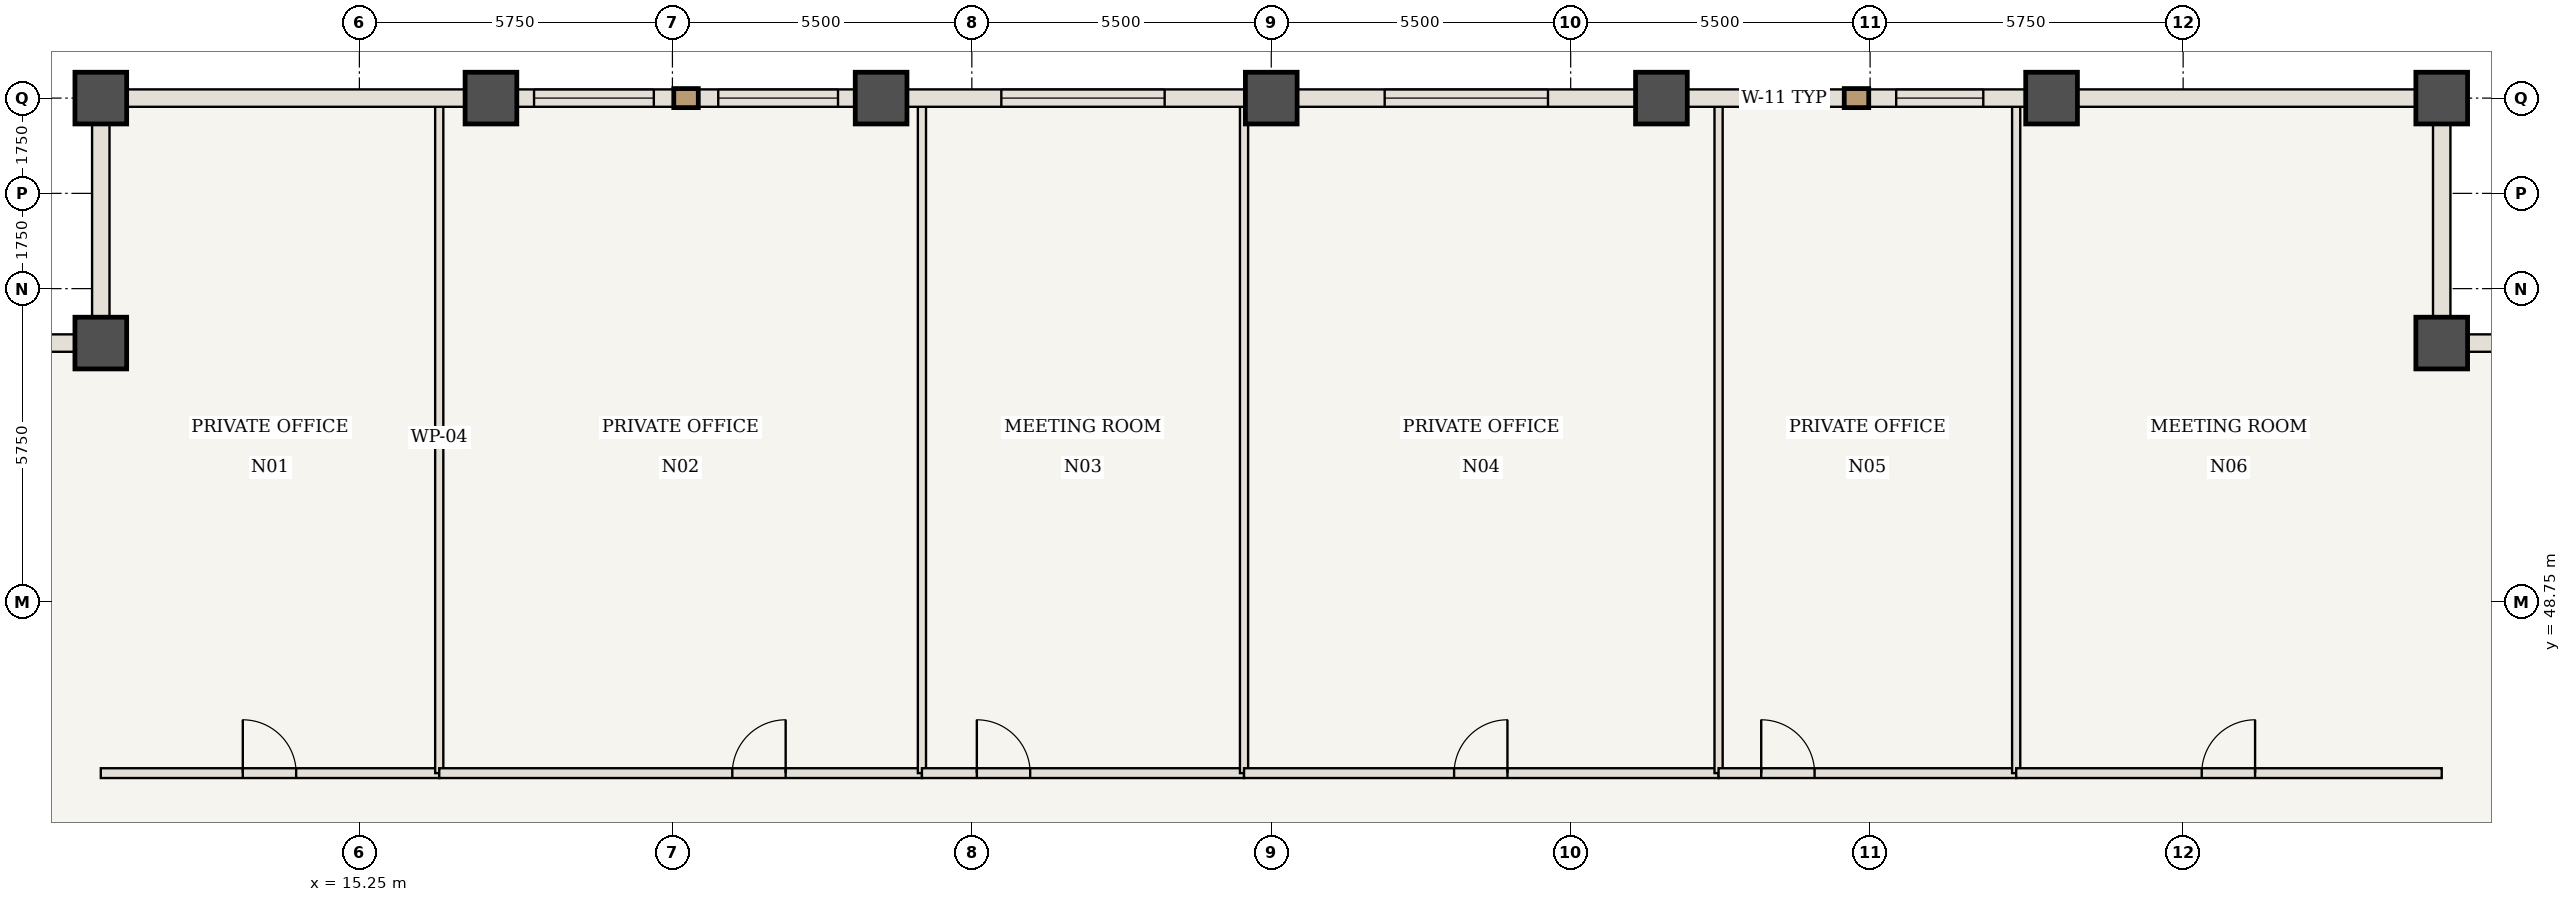
"""IFC4 building model, lengths in metres.
Left out: names, types, materials, properties, quantities, classifications, styles, units other than length and angle.
Written with IfcOpenShell. Run it as: python <this file> out.ifc"""

import sys

from ifc_helpers import new_model, si_unit, direction, frame, frame_2d, origin, origin_2d, place, context, subcontext, project, spatial, rectangle, extrude, element, fill, save


model = new_model("IFC4")
c1 = context("Model", 3, precision=1e-05, world=origin(), true_north=direction((0.0, 1.0)))
c2 = subcontext(c1, "Body", "Model", "MODEL_VIEW")
j1 = project(units=[si_unit("LENGTHUNIT", "METRE"), si_unit("PLANEANGLEUNIT", "RADIAN")], contexts=[c1])
p1 = place(None, origin())
s1 = spatial("IfcSite", under=j1, at=p1, CompositionType="ELEMENT")
p2 = place(p1, origin())
s2 = spatial("IfcBuilding", under=s1, at=p2, CompositionType="ELEMENT")
p3 = place(p2, frame((0.0, 0.0, 118.3)))
s3 = spatial("IfcBuildingStorey", under=s2, at=p3, CompositionType="ELEMENT", Elevation=118.3)
for number, where, z_axis, x_axis in (
    (1, (53.5, 53.5, 0.0), (0.0, 0.0, 1.0), (1.0, 0.0, 0.0)),
    (2, (53.5, 58.0, 0.0), (0.0, 0.0, 1.0), (1.0, 0.0, 0.0)),
    (3, (10.5, 58.0, 0.0), (0.0, 0.0, 1.0), (1.0, 0.0, 0.0)),
    (4, (10.5, 53.5, 0.0), (0.0, 0.0, 1.0), (1.0, 0.0, 0.0)),
    (5, (17.667, 58.0, 0.0), (0.0, 0.0, 1.0), (1.0, 0.0, 0.0)),
    (6, (24.833, 58.0, 0.0), (0.0, 0.0, 1.0), (1.0, 0.0, 0.0)),
    (7, (32.0, 58.0, 0.0), (0.0, 0.0, 1.0), (1.0, 0.0, 0.0)),
    (8, (39.167, 58.0, 0.0), (0.0, 0.0, 1.0), (1.0, 0.0, 0.0)),
    (9, (46.333, 58.0, 0.0), (0.0, 0.0, 1.0), (1.0, 0.0, 0.0)),
):
    element("IfcColumn", number, at=place(p3, frame(where, z_axis=z_axis, x_axis=x_axis)), inside=s3, PredefinedType="COLUMN", context=c2, shape_type="SweptSolid", body=[
        extrude(rectangle(XDim=0.95, YDim=0.95, at=origin_2d()), origin(), (0.0, 0.0, 1.0), 3.85),
    ])
p4 = place(p3, frame((10.5, 45.6, 0.0), z_axis=(0.0, 0.0, 1.0), x_axis=(1.0, 0.0, 0.0)))
e10 = element("IfcWall", 10, at=p4, inside=s3, PredefinedType="STANDARD", context=c2, shape_type="SweptSolid", body=[
    extrude(rectangle(XDim=6.217, YDim=0.18, at=frame_2d((3.108, 0.0))), origin(), (0.0, 0.0, 1.0), 3.685),
])
p5 = place(p4, frame((2.608, 0.0, 0.0)))
e11 = element("IfcOpeningElement", 11, at=p5, cuts=e10, PredefinedType="OPENING", context=c2, shape_type="SweptSolid", body=[
    extrude(rectangle(XDim=0.98, YDim=2.2, at=frame_2d((0.49, 1.1))), frame((0.0, 0.1, 0.0), z_axis=(0.0, -1.0, 0.0), x_axis=(1.0, 0.0, 0.0)), (0.0, 0.0, 1.0), 0.2),
])
p6 = place(p3, frame((16.717, 45.6, 0.0), z_axis=(0.0, 0.0, 1.0), x_axis=(0.0, 1.0, 0.0)))
e12 = element("IfcWall", 12, at=p6, inside=s3, PredefinedType="STANDARD", context=c2, shape_type="SweptSolid", body=[
    extrude(rectangle(XDim=12.34, YDim=0.15, at=frame_2d((6.17, 0.0))), origin(), (0.0, 0.0, 1.0), 3.685),
])
p7 = place(p3, frame((16.717, 45.6, 0.0), z_axis=(0.0, 0.0, 1.0), x_axis=(1.0, 0.0, 0.0)))
e13 = element("IfcWall", 13, at=p7, inside=s3, PredefinedType="STANDARD", context=c2, shape_type="SweptSolid", body=[
    extrude(rectangle(XDim=8.866, YDim=0.18, at=frame_2d((4.433, 0.0))), origin(), (0.0, 0.0, 1.0), 3.685),
])
p8 = place(p7, frame((5.383, 0.0, 0.0)))
e14 = element("IfcOpeningElement", 14, at=p8, cuts=e13, PredefinedType="OPENING", context=c2, shape_type="SweptSolid", body=[
    extrude(rectangle(XDim=0.98, YDim=2.2, at=frame_2d((0.49, 1.1))), frame((0.0, 0.1, 0.0), z_axis=(0.0, -1.0, 0.0), x_axis=(1.0, 0.0, 0.0)), (0.0, 0.0, 1.0), 0.2),
])
p9 = place(p3, frame((25.583, 45.6, 0.0), z_axis=(0.0, 0.0, 1.0), x_axis=(0.0, 1.0, 0.0)))
e15 = element("IfcWall", 15, at=p9, inside=s3, PredefinedType="STANDARD", context=c2, shape_type="SweptSolid", body=[
    extrude(rectangle(XDim=12.34, YDim=0.15, at=frame_2d((6.17, 0.0))), origin(), (0.0, 0.0, 1.0), 3.685),
])
p10 = place(p3, frame((25.583, 45.6, 0.0), z_axis=(0.0, 0.0, 1.0), x_axis=(1.0, 0.0, 0.0)))
e16 = element("IfcWall", 16, at=p10, inside=s3, PredefinedType="STANDARD", context=c2, shape_type="SweptSolid", body=[
    extrude(rectangle(XDim=5.917, YDim=0.18, at=frame_2d((2.958, 0.0))), origin(), (0.0, 0.0, 1.0), 3.685),
])
p11 = place(p10, frame((1.008, 0.0, 0.0)))
e17 = element("IfcOpeningElement", 17, at=p11, cuts=e16, PredefinedType="OPENING", context=c2, shape_type="SweptSolid", body=[
    extrude(rectangle(XDim=0.98, YDim=2.2, at=frame_2d((0.49, 1.1))), frame((0.0, 0.1, 0.0), z_axis=(0.0, -1.0, 0.0), x_axis=(1.0, 0.0, 0.0)), (0.0, 0.0, 1.0), 0.2),
])
p12 = place(p3, frame((31.5, 45.6, 0.0), z_axis=(0.0, 0.0, 1.0), x_axis=(0.0, 1.0, 0.0)))
e18 = element("IfcWall", 18, at=p12, inside=s3, PredefinedType="STANDARD", context=c2, shape_type="SweptSolid", body=[
    extrude(rectangle(XDim=12.34, YDim=0.15, at=frame_2d((6.17, 0.0))), origin(), (0.0, 0.0, 1.0), 3.685),
])
p13 = place(p3, frame((31.5, 45.6, 0.0), z_axis=(0.0, 0.0, 1.0), x_axis=(1.0, 0.0, 0.0)))
e19 = element("IfcWall", 19, at=p13, inside=s3, PredefinedType="STANDARD", context=c2, shape_type="SweptSolid", body=[
    extrude(rectangle(XDim=8.717, YDim=0.18, at=frame_2d((4.358, 0.0))), origin(), (0.0, 0.0, 1.0), 3.685),
])
p14 = place(p13, frame((3.858, 0.0, 0.0)))
e20 = element("IfcOpeningElement", 20, at=p14, cuts=e19, PredefinedType="OPENING", context=c2, shape_type="SweptSolid", body=[
    extrude(rectangle(XDim=0.98, YDim=2.2, at=frame_2d((0.49, 1.1))), frame((0.0, 0.1, 0.0), z_axis=(0.0, -1.0, 0.0), x_axis=(1.0, 0.0, 0.0)), (0.0, 0.0, 1.0), 0.2),
])
p15 = place(p3, frame((40.217, 45.6, 0.0), z_axis=(0.0, 0.0, 1.0), x_axis=(0.0, 1.0, 0.0)))
e21 = element("IfcWall", 21, at=p15, inside=s3, PredefinedType="STANDARD", context=c2, shape_type="SweptSolid", body=[
    extrude(rectangle(XDim=12.34, YDim=0.15, at=frame_2d((6.17, 0.0))), origin(), (0.0, 0.0, 1.0), 3.685),
])
p16 = place(p3, frame((40.217, 45.6, 0.0), z_axis=(0.0, 0.0, 1.0), x_axis=(1.0, 0.0, 0.0)))
e22 = element("IfcWall", 22, at=p16, inside=s3, PredefinedType="STANDARD", context=c2, shape_type="SweptSolid", body=[
    extrude(rectangle(XDim=5.467, YDim=0.18, at=frame_2d((2.733, 0.0))), origin(), (0.0, 0.0, 1.0), 3.685),
])
p17 = place(p16, frame((0.783, 0.0, 0.0)))
e23 = element("IfcOpeningElement", 23, at=p17, cuts=e22, PredefinedType="OPENING", context=c2, shape_type="SweptSolid", body=[
    extrude(rectangle(XDim=0.98, YDim=2.2, at=frame_2d((0.49, 1.1))), frame((0.0, 0.1, 0.0), z_axis=(0.0, -1.0, 0.0), x_axis=(1.0, 0.0, 0.0)), (0.0, 0.0, 1.0), 0.2),
])
p18 = place(p3, frame((45.683, 45.6, 0.0), z_axis=(0.0, 0.0, 1.0), x_axis=(0.0, 1.0, 0.0)))
e24 = element("IfcWall", 24, at=p18, inside=s3, PredefinedType="STANDARD", context=c2, shape_type="SweptSolid", body=[
    extrude(rectangle(XDim=12.34, YDim=0.15, at=frame_2d((6.17, 0.0))), origin(), (0.0, 0.0, 1.0), 3.685),
])
p19 = place(p3, frame((45.683, 45.6, 0.0), z_axis=(0.0, 0.0, 1.0), x_axis=(1.0, 0.0, 0.0)))
e25 = element("IfcWall", 25, at=p19, inside=s3, PredefinedType="STANDARD", context=c2, shape_type="SweptSolid", body=[
    extrude(rectangle(XDim=7.817, YDim=0.18, at=frame_2d((3.908, 0.0))), origin(), (0.0, 0.0, 1.0), 3.685),
])
p20 = place(p19, frame((3.408, 0.0, 0.0)))
e26 = element("IfcOpeningElement", 26, at=p20, cuts=e25, PredefinedType="OPENING", context=c2, shape_type="SweptSolid", body=[
    extrude(rectangle(XDim=0.98, YDim=2.2, at=frame_2d((0.49, 1.1))), frame((0.0, 0.1, 0.0), z_axis=(0.0, -1.0, 0.0), x_axis=(1.0, 0.0, 0.0)), (0.0, 0.0, 1.0), 0.2),
])
p21 = place(p3, frame((10.5, 58.0, 0.0), z_axis=(0.0, 0.0, 1.0), x_axis=(1.0, 0.0, 0.0)))
e27 = element("IfcWall", 27, at=p21, inside=s3, PredefinedType="USERDEFINED", context=c2, shape_type="SweptSolid", body=[
    extrude(rectangle(XDim=7.167, YDim=0.32, at=frame_2d((3.583, 0.0))), origin(), (0.0, 0.0, 1.0), 2.885),
])
p22 = place(p3, frame((17.667, 58.0, 0.0), z_axis=(0.0, 0.0, 1.0), x_axis=(1.0, 0.0, 0.0)))
e28 = element("IfcWall", 28, at=p22, inside=s3, PredefinedType="USERDEFINED", context=c2, shape_type="SweptSolid", body=[
    extrude(rectangle(XDim=7.167, YDim=0.32, at=frame_2d((3.583, 0.0))), origin(), (0.0, 0.0, 1.0), 2.885),
])
p23 = place(p22, frame((0.792, 0.0, 0.85)))
e29 = element("IfcOpeningElement", 29, at=p23, cuts=e28, PredefinedType="OPENING", context=c2, shape_type="SweptSolid", body=[
    extrude(rectangle(XDim=2.2, YDim=1.835, at=frame_2d((1.1, 0.917))), frame((0.0, 0.17, 0.0), z_axis=(0.0, -1.0, 0.0), x_axis=(1.0, 0.0, 0.0)), (0.0, 0.0, 1.0), 0.34),
])
p24 = place(p22, frame((4.175, 0.0, 0.85)))
e30 = element("IfcOpeningElement", 30, at=p24, cuts=e28, PredefinedType="OPENING", context=c2, shape_type="SweptSolid", body=[
    extrude(rectangle(XDim=2.2, YDim=1.835, at=frame_2d((1.1, 0.917))), frame((0.0, 0.17, 0.0), z_axis=(0.0, -1.0, 0.0), x_axis=(1.0, 0.0, 0.0)), (0.0, 0.0, 1.0), 0.34),
])
p25 = place(p3, frame((24.833, 58.0, 0.0), z_axis=(0.0, 0.0, 1.0), x_axis=(1.0, 0.0, 0.0)))
e31 = element("IfcWall", 31, at=p25, inside=s3, PredefinedType="USERDEFINED", context=c2, shape_type="SweptSolid", body=[
    extrude(rectangle(XDim=7.167, YDim=0.32, at=frame_2d((3.583, 0.0))), origin(), (0.0, 0.0, 1.0), 2.885),
])
p26 = place(p25, frame((2.208, 0.0, 0.85)))
e32 = element("IfcOpeningElement", 32, at=p26, cuts=e31, PredefinedType="OPENING", context=c2, shape_type="SweptSolid", body=[
    extrude(rectangle(XDim=3.0, YDim=1.835, at=frame_2d((1.5, 0.917))), frame((0.0, 0.17, 0.0), z_axis=(0.0, -1.0, 0.0), x_axis=(1.0, 0.0, 0.0)), (0.0, 0.0, 1.0), 0.34),
])
p27 = place(p3, frame((32.0, 58.0, 0.0), z_axis=(0.0, 0.0, 1.0), x_axis=(1.0, 0.0, 0.0)))
e33 = element("IfcWall", 33, at=p27, inside=s3, PredefinedType="USERDEFINED", context=c2, shape_type="SweptSolid", body=[
    extrude(rectangle(XDim=7.167, YDim=0.32, at=frame_2d((3.583, 0.0))), origin(), (0.0, 0.0, 1.0), 2.885),
])
p28 = place(p27, frame((2.083, 0.0, 0.85)))
e34 = element("IfcOpeningElement", 34, at=p28, cuts=e33, PredefinedType="OPENING", context=c2, shape_type="SweptSolid", body=[
    extrude(rectangle(XDim=3.0, YDim=1.835, at=frame_2d((1.5, 0.917))), frame((0.0, 0.17, 0.0), z_axis=(0.0, -1.0, 0.0), x_axis=(1.0, 0.0, 0.0)), (0.0, 0.0, 1.0), 0.34),
])
p29 = place(p3, frame((39.167, 58.0, 0.0), z_axis=(0.0, 0.0, 1.0), x_axis=(1.0, 0.0, 0.0)))
e35 = element("IfcWall", 35, at=p29, inside=s3, PredefinedType="USERDEFINED", context=c2, shape_type="SweptSolid", body=[
    extrude(rectangle(XDim=7.167, YDim=0.32, at=frame_2d((3.583, 0.0))), origin(), (0.0, 0.0, 1.0), 2.885),
])
p30 = place(p29, frame((1.454, 0.0, 0.85)))
e36 = element("IfcOpeningElement", 36, at=p30, cuts=e35, PredefinedType="OPENING", context=c2, shape_type="SweptSolid", body=[
    extrude(rectangle(XDim=1.6, YDim=1.835, at=frame_2d((0.8, 0.917))), frame((0.0, 0.17, 0.0), z_axis=(0.0, -1.0, 0.0), x_axis=(1.0, 0.0, 0.0)), (0.0, 0.0, 1.0), 0.34),
])
p31 = place(p29, frame((4.312, 0.0, 0.85)))
e37 = element("IfcOpeningElement", 37, at=p31, cuts=e35, PredefinedType="OPENING", context=c2, shape_type="SweptSolid", body=[
    extrude(rectangle(XDim=1.6, YDim=1.835, at=frame_2d((0.8, 0.917))), frame((0.0, 0.17, 0.0), z_axis=(0.0, -1.0, 0.0), x_axis=(1.0, 0.0, 0.0)), (0.0, 0.0, 1.0), 0.34),
])
p32 = place(p3, frame((46.333, 58.0, 0.0), z_axis=(0.0, 0.0, 1.0), x_axis=(1.0, 0.0, 0.0)))
e38 = element("IfcWall", 38, at=p32, inside=s3, PredefinedType="USERDEFINED", context=c2, shape_type="SweptSolid", body=[
    extrude(rectangle(XDim=7.167, YDim=0.32, at=frame_2d((3.583, 0.0))), origin(), (0.0, 0.0, 1.0), 2.885),
])
for number, where, z_axis, x_axis in (
    (39, (53.5, 53.5, 0.0), (0.0, 0.0, 1.0), (1.0, 0.0, 0.0)),
    (40, (53.5, 58.0, 0.0), (0.0, 0.0, 1.0), (0.0, -1.0, 0.0)),
    (41, (10.5, 53.5, 0.0), (0.0, 0.0, 1.0), (0.0, 1.0, 0.0)),
    (42, (6.0, 53.5, 0.0), (0.0, 0.0, 1.0), (1.0, 0.0, 0.0)),
):
    element("IfcWall", number, at=place(p3, frame(where, z_axis=z_axis, x_axis=x_axis)), inside=s3, PredefinedType="USERDEFINED", context=c2, shape_type="SweptSolid", body=[
        extrude(rectangle(XDim=4.5, YDim=0.32, at=frame_2d((2.25, 0.0))), origin(), (0.0, 0.0, 1.0), 2.885),
    ])
p33 = place(p5, origin())
e43 = element("IfcDoor", 43, at=p33, inside=s3, OperationType="SINGLE_SWING_LEFT", PredefinedType="DOOR", context=c2, shape_type="SweptSolid", body=[
    extrude(rectangle(XDim=0.98, YDim=2.2, at=frame_2d((0.49, 1.1))), frame((0.0, 0.025, 0.0), z_axis=(0.0, -1.0, 0.0), x_axis=(1.0, 0.0, 0.0)), (0.0, 0.0, 1.0), 0.05),
])
fill(e11, e43)
p34 = place(p8, origin())
e44 = element("IfcDoor", 44, at=p34, inside=s3, OperationType="SINGLE_SWING_RIGHT", PredefinedType="DOOR", context=c2, shape_type="SweptSolid", body=[
    extrude(rectangle(XDim=0.98, YDim=2.2, at=frame_2d((0.49, 1.1))), frame((0.0, 0.025, 0.0), z_axis=(0.0, -1.0, 0.0), x_axis=(1.0, 0.0, 0.0)), (0.0, 0.0, 1.0), 0.05),
])
fill(e14, e44)
p35 = place(p11, origin())
e45 = element("IfcDoor", 45, at=p35, inside=s3, OperationType="SINGLE_SWING_LEFT", PredefinedType="DOOR", context=c2, shape_type="SweptSolid", body=[
    extrude(rectangle(XDim=0.98, YDim=2.2, at=frame_2d((0.49, 1.1))), frame((0.0, 0.025, 0.0), z_axis=(0.0, -1.0, 0.0), x_axis=(1.0, 0.0, 0.0)), (0.0, 0.0, 1.0), 0.05),
])
fill(e17, e45)
p36 = place(p14, origin())
e46 = element("IfcDoor", 46, at=p36, inside=s3, OperationType="SINGLE_SWING_RIGHT", PredefinedType="DOOR", context=c2, shape_type="SweptSolid", body=[
    extrude(rectangle(XDim=0.98, YDim=2.2, at=frame_2d((0.49, 1.1))), frame((0.0, 0.025, 0.0), z_axis=(0.0, -1.0, 0.0), x_axis=(1.0, 0.0, 0.0)), (0.0, 0.0, 1.0), 0.05),
])
fill(e20, e46)
p37 = place(p17, origin())
e47 = element("IfcDoor", 47, at=p37, inside=s3, OperationType="SINGLE_SWING_LEFT", PredefinedType="DOOR", context=c2, shape_type="SweptSolid", body=[
    extrude(rectangle(XDim=0.98, YDim=2.2, at=frame_2d((0.49, 1.1))), frame((0.0, 0.025, 0.0), z_axis=(0.0, -1.0, 0.0), x_axis=(1.0, 0.0, 0.0)), (0.0, 0.0, 1.0), 0.05),
])
fill(e23, e47)
p38 = place(p20, origin())
e48 = element("IfcDoor", 48, at=p38, inside=s3, OperationType="SINGLE_SWING_RIGHT", PredefinedType="DOOR", context=c2, shape_type="SweptSolid", body=[
    extrude(rectangle(XDim=0.98, YDim=2.2, at=frame_2d((0.49, 1.1))), frame((0.0, 0.025, 0.0), z_axis=(0.0, -1.0, 0.0), x_axis=(1.0, 0.0, 0.0)), (0.0, 0.0, 1.0), 0.05),
])
fill(e26, e48)
p39 = place(p23, origin())
e49 = element("IfcWindow", 49, at=p39, inside=s3, PartitioningType="SINGLE_PANEL", PredefinedType="WINDOW", context=c2, shape_type="SweptSolid", body=[
    extrude(rectangle(XDim=2.2, YDim=1.835, at=frame_2d((1.1, 0.917))), frame((0.0, 0.03, 0.0), z_axis=(0.0, -1.0, 0.0), x_axis=(1.0, 0.0, 0.0)), (0.0, 0.0, 1.0), 0.06),
])
fill(e29, e49)
p40 = place(p24, origin())
e50 = element("IfcWindow", 50, at=p40, inside=s3, PartitioningType="SINGLE_PANEL", PredefinedType="WINDOW", context=c2, shape_type="SweptSolid", body=[
    extrude(rectangle(XDim=2.2, YDim=1.835, at=frame_2d((1.1, 0.917))), frame((0.0, 0.03, 0.0), z_axis=(0.0, -1.0, 0.0), x_axis=(1.0, 0.0, 0.0)), (0.0, 0.0, 1.0), 0.06),
])
fill(e30, e50)
p41 = place(p26, origin())
e51 = element("IfcWindow", 51, at=p41, inside=s3, PartitioningType="SINGLE_PANEL", PredefinedType="WINDOW", context=c2, shape_type="SweptSolid", body=[
    extrude(rectangle(XDim=3.0, YDim=1.835, at=frame_2d((1.5, 0.917))), frame((0.0, 0.03, 0.0), z_axis=(0.0, -1.0, 0.0), x_axis=(1.0, 0.0, 0.0)), (0.0, 0.0, 1.0), 0.06),
])
fill(e32, e51)
p42 = place(p28, origin())
e52 = element("IfcWindow", 52, at=p42, inside=s3, PartitioningType="SINGLE_PANEL", PredefinedType="WINDOW", context=c2, shape_type="SweptSolid", body=[
    extrude(rectangle(XDim=3.0, YDim=1.835, at=frame_2d((1.5, 0.917))), frame((0.0, 0.03, 0.0), z_axis=(0.0, -1.0, 0.0), x_axis=(1.0, 0.0, 0.0)), (0.0, 0.0, 1.0), 0.06),
])
fill(e34, e52)
p43 = place(p30, origin())
e53 = element("IfcWindow", 53, at=p43, inside=s3, PartitioningType="SINGLE_PANEL", PredefinedType="WINDOW", context=c2, shape_type="SweptSolid", body=[
    extrude(rectangle(XDim=1.6, YDim=1.835, at=frame_2d((0.8, 0.917))), frame((0.0, 0.03, 0.0), z_axis=(0.0, -1.0, 0.0), x_axis=(1.0, 0.0, 0.0)), (0.0, 0.0, 1.0), 0.06),
])
fill(e36, e53)
p44 = place(p31, origin())
e54 = element("IfcWindow", 54, at=p44, inside=s3, PartitioningType="SINGLE_PANEL", PredefinedType="WINDOW", context=c2, shape_type="SweptSolid", body=[
    extrude(rectangle(XDim=1.6, YDim=1.835, at=frame_2d((0.8, 0.917))), frame((0.0, 0.03, 0.0), z_axis=(0.0, -1.0, 0.0), x_axis=(1.0, 0.0, 0.0)), (0.0, 0.0, 1.0), 0.06),
])
fill(e37, e54)
save(model, sys.argv[1])
